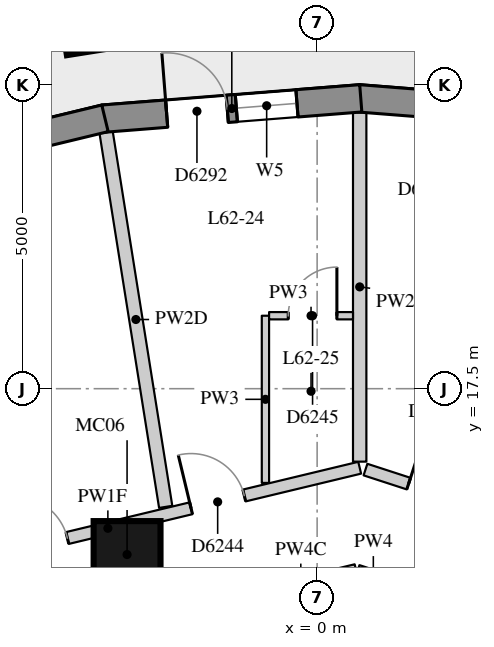
"""IFC4 building model, lengths in metres.
Left out: names, types, materials, properties, quantities, classifications, styles, units other than length and angle.
Written with IfcOpenShell. Run it as: python <this file> out.ifc"""

import sys

from ifc_helpers import new_model, si_unit, direction, frame, frame_2d, origin, origin_2d, place, context, subcontext, project, spatial, rectangle, extrude, element, fill, save


model = new_model("IFC4")
c1 = context("Model", 3, precision=1e-05, world=origin(), true_north=direction((0.0, 1.0)))
c2 = subcontext(c1, "Body", "Model", "MODEL_VIEW")
j1 = project(units=[si_unit("LENGTHUNIT", "METRE"), si_unit("PLANEANGLEUNIT", "RADIAN")], contexts=[c1])
p1 = place(None, origin())
s1 = spatial("IfcSite", under=j1, at=p1, CompositionType="ELEMENT")
p2 = place(p1, origin())
s2 = spatial("IfcBuilding", under=s1, at=p2, CompositionType="ELEMENT")
p3 = place(p2, frame((0.0, 0.0, 218.9)))
s3 = spatial("IfcBuildingStorey", under=s2, at=p3, CompositionType="ELEMENT", Elevation=218.9)
p4 = place(p3, frame((-3.789, 23.797, 0.0), z_axis=(0.0, 0.0, 1.0), x_axis=(-0.157116034607, 0.987580149491, 0.0)))
e1 = element("IfcColumn", 1, at=p4, inside=s3, PredefinedType="COLUMN", context=c2, shape_type="SweptSolid", body=[
    extrude(rectangle(XDim=1.5, YDim=0.9, at=origin_2d()), origin(), (0.0, 0.0, 1.0), 3.3),
])
p5 = place(p3, frame((-3.126, 14.772, 0.0), z_axis=(0.0, 0.0, 1.0), x_axis=(1.0, 0.0, 0.0)))
e2 = element("IfcColumn", 2, at=p5, inside=s3, PredefinedType="COLUMN", context=c2, shape_type="SweptSolid", body=[
    extrude(rectangle(XDim=1.1, YDim=1.1, at=origin_2d()), origin(), (0.0, 0.0, 1.0), 3.3),
])
p6 = place(p3, frame((4.906, 21.942, 0.0), z_axis=(0.0, 0.0, 1.0), x_axis=(-0.996902429846, 0.078648238166, 0.0)))
e3 = element("IfcWall", 3, at=p6, inside=s3, PredefinedType="SOLIDWALL", context=c2, shape_type="SweptSolid", body=[
    extrude(rectangle(XDim=4.237, YDim=0.45, at=frame_2d((2.119, 0.0))), origin(), (0.0, 0.0, 1.0), 3.02),
])
p7 = place(p6, frame((1.044, 0.0, 0.4)))
e4 = element("IfcOpeningElement", 4, at=p7, cuts=e3, PredefinedType="OPENING", context=c2, shape_type="SweptSolid", body=[
    extrude(rectangle(XDim=1.0, YDim=1.75, at=frame_2d((0.5, 0.875))), frame((0.0, 0.235, 0.0), z_axis=(0.0, -1.0, 0.0), x_axis=(1.0, 0.0, 0.0)), (0.0, 0.0, 1.0), 0.47),
])
p8 = place(p6, frame((2.194, 0.0, 0.0)))
e5 = element("IfcOpeningElement", 5, at=p8, cuts=e3, PredefinedType="OPENING", context=c2, shape_type="SweptSolid", body=[
    extrude(rectangle(XDim=1.0, YDim=2.15, at=frame_2d((0.5, 1.075))), frame((0.0, 0.235, 0.0), z_axis=(0.0, -1.0, 0.0), x_axis=(1.0, 0.0, 0.0)), (0.0, 0.0, 1.0), 0.47),
])
p9 = place(p3, frame((0.718, 22.276, 0.0), z_axis=(0.0, 0.0, 1.0), x_axis=(-0.996901346333, -0.078661970983, 0.0)))
e6 = element("IfcWall", 6, at=p9, inside=s3, PredefinedType="SOLIDWALL", context=c2, shape_type="SweptSolid", body=[
    extrude(rectangle(XDim=4.255, YDim=0.45, at=frame_2d((2.127, 0.0))), origin(), (0.0, 0.0, 1.0), 3.02),
])
p10 = place(p9, frame((1.052, 0.0, 0.4)))
e7 = element("IfcOpeningElement", 7, at=p10, cuts=e6, PredefinedType="OPENING", context=c2, shape_type="SweptSolid", body=[
    extrude(rectangle(XDim=1.0, YDim=1.75, at=frame_2d((0.5, 0.875))), frame((0.0, 0.235, 0.0), z_axis=(0.0, -1.0, 0.0), x_axis=(1.0, 0.0, 0.0)), (0.0, 0.0, 1.0), 0.47),
])
p11 = place(p9, frame((2.203, 0.0, 0.0)))
e8 = element("IfcOpeningElement", 8, at=p11, cuts=e6, PredefinedType="OPENING", context=c2, shape_type="SweptSolid", body=[
    extrude(rectangle(XDim=1.0, YDim=2.15, at=frame_2d((0.5, 1.075))), frame((0.0, 0.235, 0.0), z_axis=(0.0, -1.0, 0.0), x_axis=(1.0, 0.0, 0.0)), (0.0, 0.0, 1.0), 0.47),
])
p12 = place(p3, frame((-3.489, 21.947, 0.0), z_axis=(0.0, 0.0, 1.0), x_axis=(-0.972007311035, -0.234950606076, 0.0)))
e9 = element("IfcWall", 9, at=p12, inside=s3, PredefinedType="SOLIDWALL", context=c2, shape_type="SweptSolid", body=[
    extrude(rectangle(XDim=4.207, YDim=0.45, at=frame_2d((2.104, 0.0))), origin(), (0.0, 0.0, 1.0), 3.02),
])
p13 = place(p12, frame((1.029, 0.0, 0.4)))
e10 = element("IfcOpeningElement", 10, at=p13, cuts=e9, PredefinedType="OPENING", context=c2, shape_type="SweptSolid", body=[
    extrude(rectangle(XDim=1.0, YDim=1.75, at=frame_2d((0.5, 0.875))), frame((0.0, 0.235, 0.0), z_axis=(0.0, -1.0, 0.0), x_axis=(1.0, 0.0, 0.0)), (0.0, 0.0, 1.0), 0.47),
])
p14 = place(p12, frame((2.179, 0.0, 0.0)))
e11 = element("IfcOpeningElement", 11, at=p14, cuts=e9, PredefinedType="OPENING", context=c2, shape_type="SweptSolid", body=[
    extrude(rectangle(XDim=1.0, YDim=2.15, at=frame_2d((0.5, 1.075))), frame((0.0, 0.235, 0.0), z_axis=(0.0, -1.0, 0.0), x_axis=(1.0, 0.0, 0.0)), (0.0, 0.0, 1.0), 0.47),
])
p15 = place(p3, frame((-7.583, 14.208, 0.0), z_axis=(0.0, 0.0, 1.0), x_axis=(0.972284712223, 0.233799996531, 0.0)))
e12 = element("IfcWall", 12, at=p15, inside=s3, PredefinedType="PARTITIONING", context=c2, shape_type="SweptSolid", body=[
    extrude(rectangle(XDim=8.519, YDim=0.2, at=frame_2d((4.259, 0.0))), origin(), (0.0, 0.0, 1.0), 2.42),
])
p16 = place(p15, frame((5.667, 0.0, 0.0)))
e13 = element("IfcOpeningElement", 13, at=p16, cuts=e12, PredefinedType="OPENING", context=c2, shape_type="SweptSolid", body=[
    extrude(rectangle(XDim=0.9, YDim=2.1, at=frame_2d((0.45, 1.05))), frame((0.0, 0.11, 0.0), z_axis=(0.0, -1.0, 0.0), x_axis=(1.0, 0.0, 0.0)), (0.0, 0.0, 1.0), 0.22),
])
p17 = place(p15, frame((2.674, 0.0, 0.0)))
e14 = element("IfcOpeningElement", 14, at=p17, cuts=e12, PredefinedType="OPENING", context=c2, shape_type="SweptSolid", body=[
    extrude(rectangle(XDim=0.9, YDim=2.1, at=frame_2d((0.45, 1.05))), frame((0.0, 0.11, 0.0), z_axis=(0.0, -1.0, 0.0), x_axis=(1.0, 0.0, 0.0)), (0.0, 0.0, 1.0), 0.22),
])
p18 = place(p3, frame((0.795, 16.169, 0.0), z_axis=(0.0, 0.0, 1.0), x_axis=(0.950998491074, -0.309195520626, 0.0)))
e15 = element("IfcWall", 15, at=p18, inside=s3, PredefinedType="PARTITIONING", context=c2, shape_type="SweptSolid", body=[
    extrude(rectangle(XDim=12.357, YDim=0.2, at=frame_2d((6.179, 0.0))), origin(), (0.0, 0.0, 1.0), 3.02),
])
p19 = place(p18, frame((8.496, 0.0, 0.0)))
e16 = element("IfcOpeningElement", 16, at=p19, cuts=e15, PredefinedType="OPENING", context=c2, shape_type="SweptSolid", body=[
    extrude(rectangle(XDim=1.1, YDim=2.1, at=frame_2d((0.55, 1.05))), frame((0.0, 0.11, 0.0), z_axis=(0.0, -1.0, 0.0), x_axis=(1.0, 0.0, 0.0)), (0.0, 0.0, 1.0), 0.22),
])
p20 = place(p18, frame((4.169, 0.0, 0.0)))
e17 = element("IfcOpeningElement", 17, at=p20, cuts=e15, PredefinedType="OPENING", context=c2, shape_type="SweptSolid", body=[
    extrude(rectangle(XDim=0.9, YDim=2.1, at=frame_2d((0.45, 1.05))), frame((0.0, 0.11, 0.0), z_axis=(0.0, -1.0, 0.0), x_axis=(1.0, 0.0, 0.0)), (0.0, 0.0, 1.0), 0.22),
])
p21 = place(p18, frame((0.747, 0.0, 0.0)))
e18 = element("IfcOpeningElement", 18, at=p21, cuts=e15, PredefinedType="OPENING", context=c2, shape_type="SweptSolid", body=[
    extrude(rectangle(XDim=0.9, YDim=2.1, at=frame_2d((0.45, 1.05))), frame((0.0, 0.11, 0.0), z_axis=(0.0, -1.0, 0.0), x_axis=(1.0, 0.0, 0.0)), (0.0, 0.0, 1.0), 0.22),
])
p22 = place(p3, frame((-1.172, 14.104, 0.0), z_axis=(0.0, 0.0, 1.0), x_axis=(0.972260724841, 0.233899728371, 0.0)))
e19 = element("IfcWall", 19, at=p22, inside=s3, PredefinedType="PARTITIONING", context=c2, shape_type="SweptSolid", body=[
    extrude(rectangle(XDim=1.858, YDim=0.15, at=frame_2d((0.929, 0.0))), origin(), (0.0, 0.0, 1.0), 2.42),
])
p23 = place(p3, frame((0.673, 14.527, 0.0), z_axis=(0.0, 0.0, 1.0), x_axis=(0.950966196829, -0.309294831008, 0.0)))
e20 = element("IfcWall", 20, at=p23, inside=s3, PredefinedType="PARTITIONING", context=c2, shape_type="SweptSolid", body=[
    extrude(rectangle(XDim=0.529, YDim=0.15, at=frame_2d((0.264, 0.0))), origin(), (0.0, 0.0, 1.0), 3.02),
])
p24 = place(p3, frame((0.7, 22.049, 0.0), z_axis=(0.0, 0.0, 1.0), x_axis=(0.0, -1.0, 0.0)))
e21 = element("IfcWall", 21, at=p24, inside=s3, PredefinedType="PARTITIONING", context=c2, shape_type="SweptSolid", body=[
    extrude(rectangle(XDim=5.749, YDim=0.22, at=frame_2d((2.874, 0.0))), origin(), (0.0, 0.0, 1.0), 2.47),
])
p25 = place(p3, frame((-3.471, 21.719, 0.0), z_axis=(0.0, 0.0, 1.0), x_axis=(0.157105510173, -0.987581823786, 0.0)))
e22 = element("IfcWall", 22, at=p25, inside=s3, PredefinedType="PARTITIONING", context=c2, shape_type="SweptSolid", body=[
    extrude(rectangle(XDim=6.241, YDim=0.22, at=frame_2d((3.12, 0.0))), origin(), (0.0, 0.0, 1.0), 2.47),
])
p26 = place(p3, frame((-0.85, 15.95, 0.0), z_axis=(0.0, 0.0, 1.0), x_axis=(0.0, 1.0, 0.0)))
e23 = element("IfcWall", 23, at=p26, inside=s3, PredefinedType="PARTITIONING", context=c2, shape_type="SweptSolid", body=[
    extrude(rectangle(XDim=2.75, YDim=0.12, at=frame_2d((1.375, 0.0))), origin(), (0.0, 0.0, 1.0), 3.02),
])
p27 = place(p3, frame((-0.79, 18.7, 0.0), z_axis=(0.0, 0.0, 1.0), x_axis=(1.0, 0.0, 0.0)))
e24 = element("IfcWall", 24, at=p27, inside=s3, PredefinedType="PARTITIONING", context=c2, shape_type="SweptSolid", body=[
    extrude(rectangle(XDim=1.38, YDim=0.12, at=frame_2d((0.69, 0.0))), origin(), (0.0, 0.0, 1.0), 3.02),
])
p28 = place(p27, frame((0.315, 0.0, 0.0)))
e25 = element("IfcOpeningElement", 25, at=p28, cuts=e24, PredefinedType="OPENING", context=c2, shape_type="SweptSolid", body=[
    extrude(rectangle(XDim=0.8, YDim=2.1, at=frame_2d((0.4, 1.05))), frame((0.0, 0.07, 0.0), z_axis=(0.0, -1.0, 0.0), x_axis=(1.0, 0.0, 0.0)), (0.0, 0.0, 1.0), 0.14),
])
p29 = place(p10, origin())
e26 = element("IfcWindow", 26, at=p29, inside=s3, PartitioningType="SINGLE_PANEL", PredefinedType="WINDOW", context=c2, shape_type="SweptSolid", body=[
    extrude(rectangle(XDim=1.0, YDim=1.75, at=frame_2d((0.5, 0.875))), frame((0.0, 0.035, 0.0), z_axis=(0.0, -1.0, 0.0), x_axis=(1.0, 0.0, 0.0)), (0.0, 0.0, 1.0), 0.06),
])
fill(e7, e26)
p30 = place(p11, frame((1.0, 0.0, 0.0), z_axis=(0.0, 0.0, 1.0), x_axis=(-1.0, 0.0, 0.0)))
e27 = element("IfcDoor", 27, at=p30, inside=s3, OperationType="SINGLE_SWING_LEFT", PredefinedType="DOOR", context=c2, shape_type="SweptSolid", body=[
    extrude(rectangle(XDim=1.0, YDim=2.15, at=frame_2d((0.5, 1.075))), frame((0.0, 0.075, 0.0), z_axis=(0.0, -1.0, 0.0), x_axis=(1.0, 0.0, 0.0)), (0.0, 0.0, 1.0), 0.05),
])
fill(e8, e27)
p31 = place(p21, origin())
e28 = element("IfcDoor", 28, at=p31, inside=s3, OperationType="SINGLE_SWING_LEFT", PredefinedType="DOOR", context=c2, shape_type="SweptSolid", body=[
    extrude(rectangle(XDim=0.9, YDim=2.1, at=frame_2d((0.45, 1.05))), frame((0.0, 0.025, 0.0), z_axis=(0.0, -1.0, 0.0), x_axis=(1.0, 0.0, 0.0)), (0.0, 0.0, 1.0), 0.05),
])
fill(e18, e28)
p32 = place(p16, origin())
e29 = element("IfcDoor", 29, at=p32, inside=s3, OperationType="SINGLE_SWING_LEFT", PredefinedType="DOOR", context=c2, shape_type="SweptSolid", body=[
    extrude(rectangle(XDim=0.9, YDim=2.1, at=frame_2d((0.45, 1.05))), frame((0.0, 0.025, 0.0), z_axis=(0.0, -1.0, 0.0), x_axis=(1.0, 0.0, 0.0)), (0.0, 0.0, 1.0), 0.05),
])
fill(e13, e29)
p33 = place(p28, origin())
e30 = element("IfcDoor", 30, at=p33, inside=s3, OperationType="SINGLE_SWING_RIGHT", PredefinedType="DOOR", context=c2, shape_type="SweptSolid", body=[
    extrude(rectangle(XDim=0.8, YDim=2.1, at=frame_2d((0.4, 1.05))), frame((0.0, 0.025, 0.0), z_axis=(0.0, -1.0, 0.0), x_axis=(1.0, 0.0, 0.0)), (0.0, 0.0, 1.0), 0.05),
])
fill(e25, e30)
p34 = place(p17, origin())
e31 = element("IfcDoor", 31, at=p34, inside=s3, OperationType="SINGLE_SWING_LEFT", PredefinedType="DOOR", context=c2, shape_type="SweptSolid", body=[
    extrude(rectangle(XDim=0.9, YDim=2.1, at=frame_2d((0.45, 1.05))), frame((0.0, 0.025, 0.0), z_axis=(0.0, -1.0, 0.0), x_axis=(1.0, 0.0, 0.0)), (0.0, 0.0, 1.0), 0.05),
])
fill(e14, e31)
save(model, sys.argv[1])
